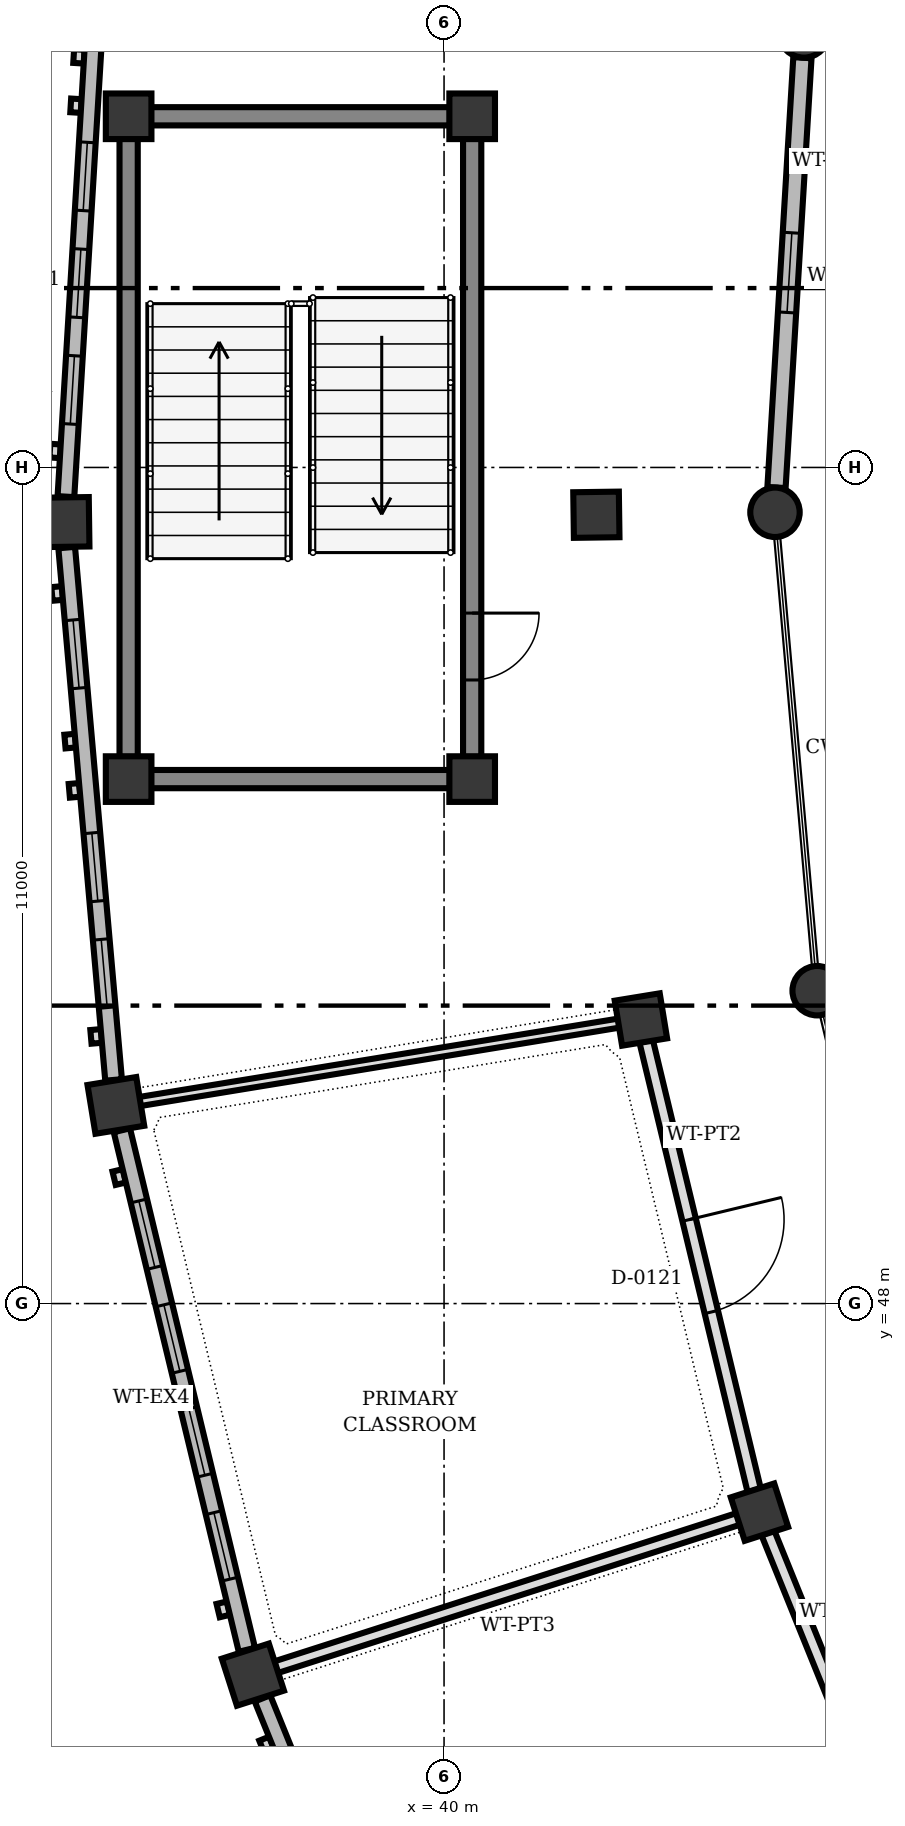
"""IFC4 building model, lengths in metres.
Left out: names, types, materials, properties, quantities, classifications, styles, units other than length and angle.
Written with IfcOpenShell. Run it as: python <this file> out.ifc"""

import sys

from ifc_helpers import new_model, si_unit, direction, frame, frame_2d, origin, origin_2d, place, context, subcontext, project, spatial, rectangle, circle, extrude, element, fill, save


model = new_model("IFC4")
c1 = context("Model", 3, precision=1e-05, world=origin(), true_north=direction((0.0, 1.0)))
c2 = subcontext(c1, "Body", "Model", "MODEL_VIEW")
j1 = project(units=[si_unit("LENGTHUNIT", "METRE"), si_unit("PLANEANGLEUNIT", "RADIAN")], contexts=[c1])
p1 = place(None, origin())
s1 = spatial("IfcSite", under=j1, at=p1, CompositionType="ELEMENT")
p2 = place(p1, origin())
s2 = spatial("IfcBuilding", under=s1, at=p2, CompositionType="ELEMENT")
p3 = place(p2, origin())
s3 = spatial("IfcBuildingStorey", under=s2, at=p3, CompositionType="ELEMENT", Elevation=0.0)
for number, where, z_axis, x_axis in (
    (1, (35.85, 54.9, 0.0), (0.0, 0.0, 1.0), (1.0, 0.0, 0.0)),
    (2, (40.37, 54.9, 0.0), (0.0, 0.0, 1.0), (1.0, 0.0, 0.0)),
    (3, (40.37, 63.62, 0.0), (0.0, 0.0, 1.0), (1.0, 0.0, 0.0)),
    (4, (35.85, 63.62, 0.0), (0.0, 0.0, 1.0), (1.0, 0.0, 0.0)),
):
    element("IfcColumn", number, at=place(p3, frame(where, z_axis=z_axis, x_axis=x_axis)), inside=s3, PredefinedType="COLUMN", context=c2, shape_type="SweptSolid", body=[
        extrude(rectangle(XDim=0.6, YDim=0.6, at=origin_2d()), origin(), (0.0, 0.0, 1.0), 4.5),
    ])
for number, where, z_axis, x_axis in (
    (5, (44.735, 64.717, 0.0), (0.0, 0.0, 1.0), (1.0, 0.0, 0.0)),
    (6, (44.354, 58.41, 0.0), (0.0, 0.0, 1.0), (1.0, 0.0, 0.0)),
    (7, (44.909, 52.116, 0.0), (0.0, 0.0, 1.0), (1.0, 0.0, 0.0)),
):
    element("IfcColumn", number, at=place(p3, frame(where, z_axis=z_axis, x_axis=x_axis)), inside=s3, PredefinedType="COLUMN", context=c2, shape_type="SweptSolid", body=[
        extrude(circle(Radius=0.325, at=origin_2d()), origin(), (0.0, 0.0, 1.0), 4.5),
    ])
for number, where, z_axis, x_axis in (
    (8, (42.004, 58.378, 0.0), (0.0, 0.0, 1.0), (-1.0, -0.014, 0.0)),
    (9, (42.59, 51.737, 0.0), (0.0, 0.0, 1.0), (-0.987, -0.161, 0.0)),
    (10, (44.15, 45.256, 0.0), (0.0, 0.0, 1.0), (-0.952, -0.305, 0.0)),
):
    element("IfcColumn", number, at=place(p3, frame(where, z_axis=z_axis, x_axis=x_axis)), inside=s3, PredefinedType="COLUMN", context=c2, shape_type="SweptSolid", body=[
        extrude(rectangle(XDim=0.6, YDim=0.6, at=origin_2d()), origin(), (0.0, 0.0, 1.0), 4.5),
    ])
for number, where, z_axis, x_axis in (
    (11, (35.005, 58.281, 0.0), (0.0, 0.0, 1.0), (-1.0, -0.014, 0.0)),
    (12, (35.682, 50.607, 0.0), (0.0, 0.0, 1.0), (-0.987, -0.161, 0.0)),
    (13, (37.485, 43.118, 0.0), (0.0, 0.0, 1.0), (-0.952, -0.305, 0.0)),
):
    element("IfcColumn", number, at=place(p3, frame(where, z_axis=z_axis, x_axis=x_axis)), inside=s3, PredefinedType="COLUMN", context=c2, shape_type="SweptSolid", body=[
        extrude(rectangle(XDim=0.65, YDim=0.65, at=origin_2d()), origin(), (0.0, 0.0, 1.0), 4.5),
    ])
p4 = place(p3, frame((35.025, 58.616, 0.0), z_axis=(0.0, 0.0, 1.0), x_axis=(0.06029906372, 0.998180355905, 0.0)))
e14 = element("IfcWall", 14, at=p4, inside=s3, PredefinedType="SOLIDWALL", context=c2, shape_type="SweptSolid", body=[
    extrude(rectangle(XDim=7.033, YDim=0.22, at=frame_2d((3.516, 0.0))), origin(), (0.0, 0.0, 1.0), 3.55),
])
p5 = place(p4, frame((0.957, 0.0, 0.85)))
e15 = element("IfcOpeningElement", 15, at=p5, cuts=e14, PredefinedType="OPENING", context=c2, shape_type="SweptSolid", body=[
    extrude(rectangle(XDim=0.9, YDim=1.4, at=frame_2d((0.45, 0.7))), frame((0.0, 0.12, 0.0), z_axis=(0.0, -1.0, 0.0), x_axis=(1.0, 0.0, 0.0)), (0.0, 0.0, 1.0), 0.24),
])
p6 = place(p4, frame((2.363, 0.0, 0.85)))
e16 = element("IfcOpeningElement", 16, at=p6, cuts=e14, PredefinedType="OPENING", context=c2, shape_type="SweptSolid", body=[
    extrude(rectangle(XDim=0.9, YDim=1.4, at=frame_2d((0.45, 0.7))), frame((0.0, 0.12, 0.0), z_axis=(0.0, -1.0, 0.0), x_axis=(1.0, 0.0, 0.0)), (0.0, 0.0, 1.0), 0.24),
])
p7 = place(p4, frame((3.77, 0.0, 0.85)))
e17 = element("IfcOpeningElement", 17, at=p7, cuts=e14, PredefinedType="OPENING", context=c2, shape_type="SweptSolid", body=[
    extrude(rectangle(XDim=0.9, YDim=1.4, at=frame_2d((0.45, 0.7))), frame((0.0, 0.12, 0.0), z_axis=(0.0, -1.0, 0.0), x_axis=(1.0, 0.0, 0.0)), (0.0, 0.0, 1.0), 0.24),
])
p8 = place(p3, frame((44.715, 64.391, 0.0), z_axis=(0.0, 0.0, 1.0), x_axis=(-0.060202310399, -0.998186195969, 0.0)))
e18 = element("IfcWall", 18, at=p8, inside=s3, PredefinedType="SOLIDWALL", context=c2, shape_type="SweptSolid", body=[
    extrude(rectangle(XDim=5.665, YDim=0.24, at=frame_2d((2.833, 0.0))), origin(), (0.0, 0.0, 1.0), 3.55),
])
p9 = place(p8, frame((2.308, 0.0, 0.9)))
e19 = element("IfcOpeningElement", 19, at=p9, cuts=e18, PredefinedType="OPENING", context=c2, shape_type="SweptSolid", body=[
    extrude(rectangle(XDim=1.05, YDim=1.4, at=frame_2d((0.525, 0.7))), frame((0.0, 0.13, 0.0), z_axis=(0.0, -1.0, 0.0), x_axis=(1.0, 0.0, 0.0)), (0.0, 0.0, 1.0), 0.26),
])
p10 = place(p3, frame((35.652, 50.942, 0.0), z_axis=(0.0, 0.0, 1.0), x_axis=(-0.087777274836, 0.996140125696, 0.0)))
e20 = element("IfcWall", 20, at=p10, inside=s3, PredefinedType="SOLIDWALL", context=c2, shape_type="SweptSolid", body=[
    extrude(rectangle(XDim=7.031, YDim=0.22, at=frame_2d((3.516, 0.0))), origin(), (0.0, 0.0, 1.0), 3.55),
])
p11 = place(p10, frame((0.956, 0.0, 0.85)))
e21 = element("IfcOpeningElement", 21, at=p11, cuts=e20, PredefinedType="OPENING", context=c2, shape_type="SweptSolid", body=[
    extrude(rectangle(XDim=0.9, YDim=1.4, at=frame_2d((0.45, 0.7))), frame((0.0, 0.12, 0.0), z_axis=(0.0, -1.0, 0.0), x_axis=(1.0, 0.0, 0.0)), (0.0, 0.0, 1.0), 0.24),
])
p12 = place(p10, frame((2.362, 0.0, 0.85)))
e22 = element("IfcOpeningElement", 22, at=p12, cuts=e20, PredefinedType="OPENING", context=c2, shape_type="SweptSolid", body=[
    extrude(rectangle(XDim=0.9, YDim=1.4, at=frame_2d((0.45, 0.7))), frame((0.0, 0.12, 0.0), z_axis=(0.0, -1.0, 0.0), x_axis=(1.0, 0.0, 0.0)), (0.0, 0.0, 1.0), 0.24),
])
p13 = place(p10, frame((5.175, 0.0, 0.85)))
e23 = element("IfcOpeningElement", 23, at=p13, cuts=e20, PredefinedType="OPENING", context=c2, shape_type="SweptSolid", body=[
    extrude(rectangle(XDim=0.9, YDim=1.4, at=frame_2d((0.45, 0.7))), frame((0.0, 0.12, 0.0), z_axis=(0.0, -1.0, 0.0), x_axis=(1.0, 0.0, 0.0)), (0.0, 0.0, 1.0), 0.24),
])
p14 = place(p3, frame((37.406, 43.445, 0.0), z_axis=(0.0, 0.0, 1.0), x_axis=(-0.233995482049, 0.972237684098, 0.0)))
e24 = element("IfcWall", 24, at=p14, inside=s3, PredefinedType="SOLIDWALL", context=c2, shape_type="SweptSolid", body=[
    extrude(rectangle(XDim=7.03, YDim=0.22, at=frame_2d((3.515, 0.0))), origin(), (0.0, 0.0, 1.0), 3.55),
])
p15 = place(p14, frame((0.956, 0.0, 0.85)))
e25 = element("IfcOpeningElement", 25, at=p15, cuts=e24, PredefinedType="OPENING", context=c2, shape_type="SweptSolid", body=[
    extrude(rectangle(XDim=0.9, YDim=1.4, at=frame_2d((0.45, 0.7))), frame((0.0, 0.12, 0.0), z_axis=(0.0, -1.0, 0.0), x_axis=(1.0, 0.0, 0.0)), (0.0, 0.0, 1.0), 0.24),
])
p16 = place(p14, frame((2.362, 0.0, 0.85)))
e26 = element("IfcOpeningElement", 26, at=p16, cuts=e24, PredefinedType="OPENING", context=c2, shape_type="SweptSolid", body=[
    extrude(rectangle(XDim=0.9, YDim=1.4, at=frame_2d((0.45, 0.7))), frame((0.0, 0.12, 0.0), z_axis=(0.0, -1.0, 0.0), x_axis=(1.0, 0.0, 0.0)), (0.0, 0.0, 1.0), 0.24),
])
p17 = place(p14, frame((3.768, 0.0, 0.85)))
e27 = element("IfcOpeningElement", 27, at=p17, cuts=e24, PredefinedType="OPENING", context=c2, shape_type="SweptSolid", body=[
    extrude(rectangle(XDim=0.9, YDim=1.4, at=frame_2d((0.45, 0.7))), frame((0.0, 0.12, 0.0), z_axis=(0.0, -1.0, 0.0), x_axis=(1.0, 0.0, 0.0)), (0.0, 0.0, 1.0), 0.24),
])
p18 = place(p14, frame((5.174, 0.0, 0.85)))
e28 = element("IfcOpeningElement", 28, at=p18, cuts=e24, PredefinedType="OPENING", context=c2, shape_type="SweptSolid", body=[
    extrude(rectangle(XDim=0.9, YDim=1.4, at=frame_2d((0.45, 0.7))), frame((0.0, 0.12, 0.0), z_axis=(0.0, -1.0, 0.0), x_axis=(1.0, 0.0, 0.0)), (0.0, 0.0, 1.0), 0.24),
])
p19 = place(p3, frame((40.249, 36.289, 0.0), z_axis=(0.0, 0.0, 1.0), x_axis=(-0.375213359758, 0.926938474042, 0.0)))
e29 = element("IfcWall", 29, at=p19, inside=s3, PredefinedType="SOLIDWALL", context=c2, shape_type="SweptSolid", body=[
    extrude(rectangle(XDim=7.031, YDim=0.22, at=frame_2d((3.515, 0.0))), origin(), (0.0, 0.0, 1.0), 3.55),
])
p20 = place(p19, frame((0.956, 0.0, 0.85)))
e30 = element("IfcOpeningElement", 30, at=p20, cuts=e29, PredefinedType="OPENING", context=c2, shape_type="SweptSolid", body=[
    extrude(rectangle(XDim=0.9, YDim=1.4, at=frame_2d((0.45, 0.7))), frame((0.0, 0.12, 0.0), z_axis=(0.0, -1.0, 0.0), x_axis=(1.0, 0.0, 0.0)), (0.0, 0.0, 1.0), 0.24),
])
p21 = place(p19, frame((2.362, 0.0, 0.85)))
e31 = element("IfcOpeningElement", 31, at=p21, cuts=e29, PredefinedType="OPENING", context=c2, shape_type="SweptSolid", body=[
    extrude(rectangle(XDim=0.9, YDim=1.4, at=frame_2d((0.45, 0.7))), frame((0.0, 0.12, 0.0), z_axis=(0.0, -1.0, 0.0), x_axis=(1.0, 0.0, 0.0)), (0.0, 0.0, 1.0), 0.24),
])
p22 = place(p19, frame((3.768, 0.0, 0.85)))
e32 = element("IfcOpeningElement", 32, at=p22, cuts=e29, PredefinedType="OPENING", context=c2, shape_type="SweptSolid", body=[
    extrude(rectangle(XDim=0.9, YDim=1.4, at=frame_2d((0.45, 0.7))), frame((0.0, 0.12, 0.0), z_axis=(0.0, -1.0, 0.0), x_axis=(1.0, 0.0, 0.0)), (0.0, 0.0, 1.0), 0.24),
])
p23 = place(p19, frame((5.175, 0.0, 0.85)))
e33 = element("IfcOpeningElement", 33, at=p23, cuts=e29, PredefinedType="OPENING", context=c2, shape_type="SweptSolid", body=[
    extrude(rectangle(XDim=0.9, YDim=1.4, at=frame_2d((0.45, 0.7))), frame((0.0, 0.12, 0.0), z_axis=(0.0, -1.0, 0.0), x_axis=(1.0, 0.0, 0.0)), (0.0, 0.0, 1.0), 0.24),
])
p24 = place(p3, frame((35.85, 55.192, 0.0), z_axis=(0.0, 0.0, 1.0), x_axis=(0.0, 1.0, 0.0)))
e34 = element("IfcWall", 34, at=p24, inside=s3, PredefinedType="SHEAR", context=c2, shape_type="SweptSolid", body=[
    extrude(rectangle(XDim=8.136, YDim=0.24, at=frame_2d((4.068, 0.0))), origin(), (0.0, 0.0, 1.0), 4.24),
])
p25 = place(p3, frame((40.37, 63.328, 0.0), z_axis=(0.0, 0.0, 1.0), x_axis=(0.0, -1.0, 0.0)))
e35 = element("IfcWall", 35, at=p25, inside=s3, PredefinedType="SHEAR", context=c2, shape_type="SweptSolid", body=[
    extrude(rectangle(XDim=8.136, YDim=0.24, at=frame_2d((4.068, 0.0))), origin(), (0.0, 0.0, 1.0), 4.24),
])
p26 = place(p25, frame((6.244, 0.0, 0.0)))
e36 = element("IfcOpeningElement", 36, at=p26, cuts=e35, PredefinedType="OPENING", context=c2, shape_type="SweptSolid", body=[
    extrude(rectangle(XDim=0.88, YDim=2.1, at=frame_2d((0.44, 1.05))), frame((0.0, 0.13, 0.0), z_axis=(0.0, -1.0, 0.0), x_axis=(1.0, 0.0, 0.0)), (0.0, 0.0, 1.0), 0.26),
])
for number, where, z_axis, x_axis in (
    (37, (40.078, 54.9, 0.0), (0.0, 0.0, 1.0), (-1.0, 0.0, 0.0)),
    (38, (40.078, 63.62, 0.0), (0.0, 0.0, 1.0), (-1.0, 0.0, 0.0)),
):
    element("IfcWall", number, at=place(p3, frame(where, z_axis=z_axis, x_axis=x_axis)), inside=s3, PredefinedType="SHEAR", context=c2, shape_type="SweptSolid", body=[
        extrude(rectangle(XDim=3.936, YDim=0.24, at=frame_2d((1.968, 0.0))), origin(), (0.0, 0.0, 1.0), 4.24),
    ])
p27 = place(p3, frame((42.302, 51.69, 0.0), z_axis=(0.0, 0.0, 1.0), x_axis=(-0.986875911207, -0.161480450458, 0.0)))
e39 = element("IfcWall", 39, at=p27, inside=s3, PredefinedType="PARTITIONING", context=c2, shape_type="SweptSolid", body=[
    extrude(rectangle(XDim=6.391, YDim=0.12, at=frame_2d((3.195, 0.0))), origin(), (0.0, 0.0, 1.0), 3.572),
])
p28 = place(p3, frame((43.872, 45.167, 0.0), z_axis=(0.0, 0.0, 1.0), x_axis=(-0.952209655982, -0.305445201395, 0.0)))
e40 = element("IfcWall", 40, at=p28, inside=s3, PredefinedType="PARTITIONING", context=c2, shape_type="SweptSolid", body=[
    extrude(rectangle(XDim=6.39, YDim=0.16, at=frame_2d((3.195, 0.0))), origin(), (0.0, 0.0, 1.0), 3.572),
])
p29 = place(p3, frame((42.659, 51.452, 0.0), z_axis=(0.0, 0.0, 1.0), x_axis=(0.23391817251, -0.972256287493, 0.0)))
e41 = element("IfcWall", 41, at=p29, inside=s3, PredefinedType="PARTITIONING", context=c2, shape_type="SweptSolid", body=[
    extrude(rectangle(XDim=6.08, YDim=0.18, at=frame_2d((3.04, 0.0))), origin(), (0.0, 0.0, 1.0), 3.572),
])
p30 = place(p29, frame((2.415, 0.0, 0.0)))
e42 = element("IfcOpeningElement", 42, at=p30, cuts=e41, PredefinedType="OPENING", context=c2, shape_type="SweptSolid", body=[
    extrude(rectangle(XDim=1.25, YDim=2.2, at=frame_2d((0.625, 1.1))), frame((0.0, 0.1, 0.0), z_axis=(0.0, -1.0, 0.0), x_axis=(1.0, 0.0, 0.0)), (0.0, 0.0, 1.0), 0.2),
])
p31 = place(p3, frame((44.26, 44.985, 0.0), z_axis=(0.0, 0.0, 1.0), x_axis=(0.375035083014, -0.927010618337, 0.0)))
e43 = element("IfcWall", 43, at=p31, inside=s3, PredefinedType="PARTITIONING", context=c2, shape_type="SweptSolid", body=[
    extrude(rectangle(XDim=6.082, YDim=0.18, at=frame_2d((3.041, 0.0))), origin(), (0.0, 0.0, 1.0), 3.572),
])
p32 = place(p31, frame((2.266, 0.0, 0.0)))
e44 = element("IfcOpeningElement", 44, at=p32, cuts=e43, PredefinedType="OPENING", context=c2, shape_type="SweptSolid", body=[
    extrude(rectangle(XDim=1.55, YDim=2.2, at=frame_2d((0.775, 1.1))), frame((0.0, 0.1, 0.0), z_axis=(0.0, -1.0, 0.0), x_axis=(1.0, 0.0, 0.0)), (0.0, 0.0, 1.0), 0.2),
])
p33 = place(p5, origin())
e45 = element("IfcWindow", 45, at=p33, inside=s3, PartitioningType="SINGLE_PANEL", PredefinedType="WINDOW", context=c2, shape_type="SweptSolid", body=[
    extrude(rectangle(XDim=0.9, YDim=1.4, at=frame_2d((0.45, 0.7))), frame((0.0, 0.03, 0.0), z_axis=(0.0, -1.0, 0.0), x_axis=(1.0, 0.0, 0.0)), (0.0, 0.0, 1.0), 0.06),
])
fill(e15, e45)
p34 = place(p6, origin())
e46 = element("IfcWindow", 46, at=p34, inside=s3, PartitioningType="SINGLE_PANEL", PredefinedType="WINDOW", context=c2, shape_type="SweptSolid", body=[
    extrude(rectangle(XDim=0.9, YDim=1.4, at=frame_2d((0.45, 0.7))), frame((0.0, 0.03, 0.0), z_axis=(0.0, -1.0, 0.0), x_axis=(1.0, 0.0, 0.0)), (0.0, 0.0, 1.0), 0.06),
])
fill(e16, e46)
p35 = place(p7, origin())
e47 = element("IfcWindow", 47, at=p35, inside=s3, PartitioningType="SINGLE_PANEL", PredefinedType="WINDOW", context=c2, shape_type="SweptSolid", body=[
    extrude(rectangle(XDim=0.9, YDim=1.4, at=frame_2d((0.45, 0.7))), frame((0.0, 0.03, 0.0), z_axis=(0.0, -1.0, 0.0), x_axis=(1.0, 0.0, 0.0)), (0.0, 0.0, 1.0), 0.06),
])
fill(e17, e47)
p36 = place(p9, origin())
e48 = element("IfcWindow", 48, at=p36, inside=s3, PartitioningType="SINGLE_PANEL", PredefinedType="WINDOW", context=c2, shape_type="SweptSolid", body=[
    extrude(rectangle(XDim=1.05, YDim=1.4, at=frame_2d((0.525, 0.7))), frame((0.0, 0.03, 0.0), z_axis=(0.0, -1.0, 0.0), x_axis=(1.0, 0.0, 0.0)), (0.0, 0.0, 1.0), 0.06),
])
fill(e19, e48)
p37 = place(p11, origin())
e49 = element("IfcWindow", 49, at=p37, inside=s3, PartitioningType="SINGLE_PANEL", PredefinedType="WINDOW", context=c2, shape_type="SweptSolid", body=[
    extrude(rectangle(XDim=0.9, YDim=1.4, at=frame_2d((0.45, 0.7))), frame((0.0, 0.03, 0.0), z_axis=(0.0, -1.0, 0.0), x_axis=(1.0, 0.0, 0.0)), (0.0, 0.0, 1.0), 0.06),
])
fill(e21, e49)
p38 = place(p12, origin())
e50 = element("IfcWindow", 50, at=p38, inside=s3, PartitioningType="SINGLE_PANEL", PredefinedType="WINDOW", context=c2, shape_type="SweptSolid", body=[
    extrude(rectangle(XDim=0.9, YDim=1.4, at=frame_2d((0.45, 0.7))), frame((0.0, 0.03, 0.0), z_axis=(0.0, -1.0, 0.0), x_axis=(1.0, 0.0, 0.0)), (0.0, 0.0, 1.0), 0.06),
])
fill(e22, e50)
p39 = place(p13, origin())
e51 = element("IfcWindow", 51, at=p39, inside=s3, PartitioningType="SINGLE_PANEL", PredefinedType="WINDOW", context=c2, shape_type="SweptSolid", body=[
    extrude(rectangle(XDim=0.9, YDim=1.4, at=frame_2d((0.45, 0.7))), frame((0.0, 0.03, 0.0), z_axis=(0.0, -1.0, 0.0), x_axis=(1.0, 0.0, 0.0)), (0.0, 0.0, 1.0), 0.06),
])
fill(e23, e51)
p40 = place(p15, origin())
e52 = element("IfcWindow", 52, at=p40, inside=s3, PartitioningType="SINGLE_PANEL", PredefinedType="WINDOW", context=c2, shape_type="SweptSolid", body=[
    extrude(rectangle(XDim=0.9, YDim=1.4, at=frame_2d((0.45, 0.7))), frame((0.0, 0.03, 0.0), z_axis=(0.0, -1.0, 0.0), x_axis=(1.0, 0.0, 0.0)), (0.0, 0.0, 1.0), 0.06),
])
fill(e25, e52)
p41 = place(p16, origin())
e53 = element("IfcWindow", 53, at=p41, inside=s3, PartitioningType="SINGLE_PANEL", PredefinedType="WINDOW", context=c2, shape_type="SweptSolid", body=[
    extrude(rectangle(XDim=0.9, YDim=1.4, at=frame_2d((0.45, 0.7))), frame((0.0, 0.03, 0.0), z_axis=(0.0, -1.0, 0.0), x_axis=(1.0, 0.0, 0.0)), (0.0, 0.0, 1.0), 0.06),
])
fill(e26, e53)
p42 = place(p17, origin())
e54 = element("IfcWindow", 54, at=p42, inside=s3, PartitioningType="SINGLE_PANEL", PredefinedType="WINDOW", context=c2, shape_type="SweptSolid", body=[
    extrude(rectangle(XDim=0.9, YDim=1.4, at=frame_2d((0.45, 0.7))), frame((0.0, 0.03, 0.0), z_axis=(0.0, -1.0, 0.0), x_axis=(1.0, 0.0, 0.0)), (0.0, 0.0, 1.0), 0.06),
])
fill(e27, e54)
p43 = place(p18, origin())
e55 = element("IfcWindow", 55, at=p43, inside=s3, PartitioningType="SINGLE_PANEL", PredefinedType="WINDOW", context=c2, shape_type="SweptSolid", body=[
    extrude(rectangle(XDim=0.9, YDim=1.4, at=frame_2d((0.45, 0.7))), frame((0.0, 0.03, 0.0), z_axis=(0.0, -1.0, 0.0), x_axis=(1.0, 0.0, 0.0)), (0.0, 0.0, 1.0), 0.06),
])
fill(e28, e55)
p44 = place(p26, origin())
e56 = element("IfcDoor", 56, at=p44, inside=s3, OperationType="SINGLE_SWING_LEFT", PredefinedType="DOOR", context=c2, shape_type="SweptSolid", body=[
    extrude(rectangle(XDim=0.88, YDim=2.1, at=frame_2d((0.44, 1.05))), frame((0.0, 0.025, 0.0), z_axis=(0.0, -1.0, 0.0), x_axis=(1.0, 0.0, 0.0)), (0.0, 0.0, 1.0), 0.05),
])
fill(e36, e56)
p45 = place(p30, origin())
e57 = element("IfcDoor", 57, at=p45, inside=s3, OperationType="SINGLE_SWING_LEFT", PredefinedType="DOOR", context=c2, shape_type="SweptSolid", body=[
    extrude(rectangle(XDim=1.25, YDim=2.2, at=frame_2d((0.625, 1.1))), frame((0.0, 0.025, 0.0), z_axis=(0.0, -1.0, 0.0), x_axis=(1.0, 0.0, 0.0)), (0.0, 0.0, 1.0), 0.05),
])
fill(e42, e57)
save(model, sys.argv[1])
